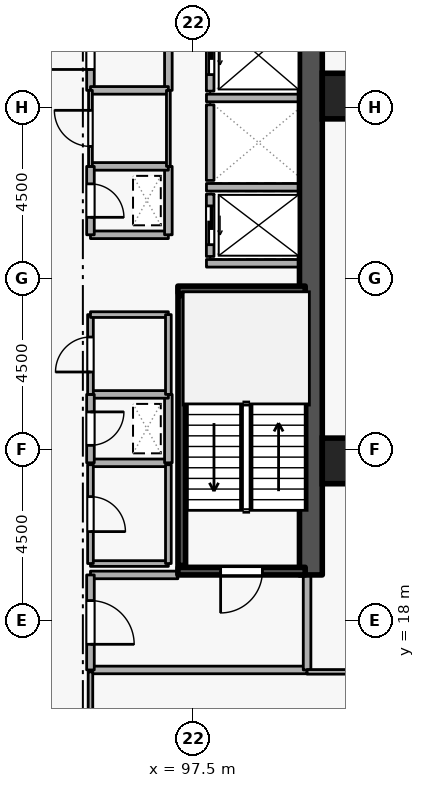
"""IFC4 building model, lengths in metres.
Left out: names, types, materials, properties, quantities, classifications, styles, units other than length and angle.
Written with IfcOpenShell. Run it as: python <this file> out.ifc"""

import sys

from ifc_helpers import new_model, si_unit, direction, frame, frame_2d, origin, origin_2d, place, context, subcontext, project, spatial, rectangle, extrude, element, fill, save


model = new_model("IFC4")
c1 = context("Model", 3, precision=1e-05, world=origin(), true_north=direction((0.0, 1.0)))
c2 = subcontext(c1, "Body", "Model", "MODEL_VIEW")
j1 = project(units=[si_unit("LENGTHUNIT", "METRE"), si_unit("PLANEANGLEUNIT", "RADIAN")], contexts=[c1])
p1 = place(None, origin())
s1 = spatial("IfcSite", under=j1, at=p1, CompositionType="ELEMENT")
p2 = place(p1, origin())
s2 = spatial("IfcBuilding", under=s1, at=p2, CompositionType="ELEMENT")
p3 = place(p2, frame((0.0, 0.0, 90.9)))
s3 = spatial("IfcBuildingStorey", under=s2, at=p3, CompositionType="ELEMENT", Elevation=90.9)
p4 = place(p3, frame((100.6, 19.2, 0.0), z_axis=(0.0, 0.0, 1.0), x_axis=(0.0, 1.0, 0.0)))
e1 = element("IfcWall", 1, at=p4, inside=s3, PredefinedType="SHEAR", context=c2, shape_type="SweptSolid", body=[
    extrude(rectangle(XDim=15.6, YDim=0.6, at=frame_2d((7.8, 0.0))), origin(), (0.0, 0.0, 1.0), 3.6),
])
for number, where, z_axis, x_axis in (
    (2, (101.5, 22.2, 0.0), (0.0, 0.0, 1.0), (1.0, 0.0, 0.0)),
    (3, (101.5, 31.8, 0.0), (0.0, 0.0, 1.0), (1.0, 0.0, 0.0)),
):
    element("IfcColumn", number, at=place(p3, frame(where, z_axis=z_axis, x_axis=x_axis)), inside=s3, PredefinedType="COLUMN", context=c2, shape_type="SweptSolid", body=[
        extrude(rectangle(XDim=1.2, YDim=1.2, at=origin_2d()), origin(), (0.0, 0.0, 1.0), 3.6),
    ])
p5 = place(p3, frame((97.95, 29.22, 0.0), z_axis=(0.0, 0.0, 1.0), x_axis=(0.0, -1.0, 0.0)))
e4 = element("IfcWall", 4, at=p5, inside=s3, PredefinedType="STANDARD", context=c2, shape_type="SweptSolid", body=[
    extrude(rectangle(XDim=1.64, YDim=0.2, at=frame_2d((0.82, 0.0))), origin(), (0.0, 0.0, 1.0), 3.34),
])
p6 = place(p5, frame((0.31, 0.0, 0.0)))
e5 = element("IfcOpeningElement", 5, at=p6, cuts=e4, PredefinedType="OPENING", context=c2, shape_type="SweptSolid", body=[
    extrude(rectangle(XDim=1.02, YDim=2.06, at=frame_2d((0.51, 1.03))), frame((0.0, 0.11, 0.0), z_axis=(0.0, -1.0, 0.0), x_axis=(1.0, 0.0, 0.0)), (0.0, 0.0, 1.0), 0.22),
])
p7 = place(p3, frame((97.95, 31.57, 0.0), z_axis=(0.0, 0.0, 1.0), x_axis=(0.0, -1.0, 0.0)))
e6 = element("IfcWall", 6, at=p7, inside=s3, PredefinedType="STANDARD", context=c2, shape_type="SweptSolid", body=[
    extrude(rectangle(XDim=1.99, YDim=0.2, at=frame_2d((0.995, 0.0))), origin(), (0.0, 0.0, 1.0), 3.34),
])
p8 = place(p3, frame((97.95, 33.82, 0.0), z_axis=(0.0, 0.0, 1.0), x_axis=(0.0, -1.0, 0.0)))
e7 = element("IfcWall", 7, at=p8, inside=s3, PredefinedType="STANDARD", context=c2, shape_type="SweptSolid", body=[
    extrude(rectangle(XDim=1.89, YDim=0.2, at=frame_2d((0.945, 0.0))), origin(), (0.0, 0.0, 1.0), 3.34),
])
p9 = place(p8, frame((0.435, 0.0, 0.0)))
e8 = element("IfcOpeningElement", 8, at=p9, cuts=e7, PredefinedType="OPENING", context=c2, shape_type="SweptSolid", body=[
    extrude(rectangle(XDim=1.02, YDim=2.06, at=frame_2d((0.51, 1.03))), frame((0.0, 0.11, 0.0), z_axis=(0.0, -1.0, 0.0), x_axis=(1.0, 0.0, 0.0)), (0.0, 0.0, 1.0), 0.22),
])
for number, where, z_axis, x_axis in (
    (9, (97.852, 29.4, 0.0), (0.0, 0.0, 1.0), (1.0, 0.0, 0.0)),
    (10, (97.852, 27.4, 0.0), (0.0, 0.0, 1.0), (1.0, 0.0, 0.0)),
    (11, (97.852, 31.75, 0.0), (0.0, 0.0, 1.0), (1.0, 0.0, 0.0)),
):
    element("IfcWall", number, at=place(p3, frame(where, z_axis=z_axis, x_axis=x_axis)), inside=s3, PredefinedType="STANDARD", context=c2, shape_type="SweptSolid", body=[
        extrude(rectangle(XDim=2.436, YDim=0.2, at=frame_2d((1.218, 0.0))), origin(), (0.0, 0.0, 1.0), 3.34),
    ])
p10 = place(p3, frame((100.45, 19.3, 0.0), z_axis=(0.0, 0.0, 1.0), x_axis=(-1.0, 0.0, 0.0)))
e12 = element("IfcWall", 12, at=p10, inside=s3, PredefinedType="SHEAR", context=c2, shape_type="SweptSolid", body=[
    extrude(rectangle(XDim=3.35, YDim=0.2, at=frame_2d((1.675, 0.0))), origin(), (0.0, 0.0, 1.0), 3.6),
])
p11 = place(p10, frame((1.125, 0.0, 0.0)))
e13 = element("IfcOpeningElement", 13, at=p11, cuts=e12, PredefinedType="OPENING", context=c2, shape_type="SweptSolid", body=[
    extrude(rectangle(XDim=1.1, YDim=2.1, at=frame_2d((0.55, 1.05))), frame((0.0, 0.11, 0.0), z_axis=(0.0, -1.0, 0.0), x_axis=(1.0, 0.0, 0.0)), (0.0, 0.0, 1.0), 0.22),
])
p12 = place(p3, frame((97.1, 26.7, 0.0), z_axis=(0.0, 0.0, 1.0), x_axis=(1.0, 0.0, 0.0)))
e14 = element("IfcWall", 14, at=p12, inside=s3, PredefinedType="SHEAR", context=c2, shape_type="SweptSolid", body=[
    extrude(rectangle(XDim=3.35, YDim=0.2, at=frame_2d((1.675, 0.0))), origin(), (0.0, 0.0, 1.0), 3.6),
])
p13 = place(p3, frame((97.203, 26.55, 0.0), z_axis=(0.0, 0.0, 1.0), x_axis=(0.0, -1.0, 0.0)))
e15 = element("IfcWall", 15, at=p13, inside=s3, PredefinedType="SHEAR", context=c2, shape_type="SweptSolid", body=[
    extrude(rectangle(XDim=7.1, YDim=0.2, at=frame_2d((3.55, 0.0))), origin(), (0.0, 0.0, 1.0), 3.6),
])
p14 = place(p3, frame((94.8, 16.7, 0.0), z_axis=(0.0, 0.0, 1.0), x_axis=(1.0, 0.0, 0.0)))
e16 = element("IfcWall", 16, at=p14, inside=s3, PredefinedType="STANDARD", context=c2, shape_type="SweptSolid", body=[
    extrude(rectangle(XDim=5.7, YDim=0.2, at=frame_2d((2.85, 0.0))), origin(), (0.0, 0.0, 1.0), 3.34),
])
p15 = place(p3, frame((100.5, 16.7, 0.0), z_axis=(0.0, 0.0, 1.0), x_axis=(0.0, 1.0, 0.0)))
e17 = element("IfcWall", 17, at=p15, inside=s3, PredefinedType="STANDARD", context=c2, shape_type="SweptSolid", body=[
    extrude(rectangle(XDim=2.5, YDim=0.2, at=frame_2d((1.25, 0.0))), origin(), (0.0, 0.0, 1.0), 3.34),
])
p16 = place(p3, frame((97.1, 19.2, 0.0), z_axis=(0.0, 0.0, 1.0), x_axis=(-1.0, 0.0, 0.0)))
e18 = element("IfcWall", 18, at=p16, inside=s3, PredefinedType="STANDARD", context=c2, shape_type="SweptSolid", body=[
    extrude(rectangle(XDim=2.3, YDim=0.2, at=frame_2d((1.15, 0.0))), origin(), (0.0, 0.0, 1.0), 2.545),
])
p17 = place(p3, frame((94.8, 19.2, 0.0), z_axis=(0.0, 0.0, 1.0), x_axis=(0.0, -1.0, 0.0)))
e19 = element("IfcWall", 19, at=p17, inside=s3, PredefinedType="STANDARD", context=c2, shape_type="SweptSolid", body=[
    extrude(rectangle(XDim=2.5, YDim=0.2, at=frame_2d((1.25, 0.0))), origin(), (0.0, 0.0, 1.0), 3.34),
])
p18 = place(p17, frame((0.675, 0.0, 0.0)))
e20 = element("IfcOpeningElement", 20, at=p18, cuts=e19, PredefinedType="OPENING", context=c2, shape_type="SweptSolid", body=[
    extrude(rectangle(XDim=1.15, YDim=2.1, at=frame_2d((0.575, 1.05))), frame((0.0, 0.11, 0.0), z_axis=(0.0, -1.0, 0.0), x_axis=(1.0, 0.0, 0.0)), (0.0, 0.0, 1.0), 0.22),
])
p19 = place(p3, frame((94.8, 28.15, 0.0), z_axis=(0.0, 0.0, 1.0), x_axis=(1.0, 0.0, 0.0)))
e21 = element("IfcWall", 21, at=p19, inside=s3, PredefinedType="STANDARD", context=c2, shape_type="SweptSolid", body=[
    extrude(rectangle(XDim=2.05, YDim=0.2, at=frame_2d((1.025, 0.0))), origin(), (0.0, 0.0, 1.0), 3.34),
])
p20 = place(p3, frame((96.85, 28.15, 0.0), z_axis=(0.0, 0.0, 1.0), x_axis=(0.0, 1.0, 0.0)))
e22 = element("IfcWall", 22, at=p20, inside=s3, PredefinedType="STANDARD", context=c2, shape_type="SweptSolid", body=[
    extrude(rectangle(XDim=1.8, YDim=0.2, at=frame_2d((0.9, 0.0))), origin(), (0.0, 0.0, 1.0), 3.34),
])
p21 = place(p3, frame((96.85, 29.95, 0.0), z_axis=(0.0, 0.0, 1.0), x_axis=(-1.0, 0.0, 0.0)))
e23 = element("IfcWall", 23, at=p21, inside=s3, PredefinedType="STANDARD", context=c2, shape_type="SweptSolid", body=[
    extrude(rectangle(XDim=2.05, YDim=0.2, at=frame_2d((1.025, 0.0))), origin(), (0.0, 0.0, 1.0), 3.34),
])
p22 = place(p3, frame((94.8, 29.95, 0.0), z_axis=(0.0, 0.0, 1.0), x_axis=(0.0, -1.0, 0.0)))
e24 = element("IfcWall", 24, at=p22, inside=s3, PredefinedType="STANDARD", context=c2, shape_type="SweptSolid", body=[
    extrude(rectangle(XDim=1.8, YDim=0.2, at=frame_2d((0.9, 0.0))), origin(), (0.0, 0.0, 1.0), 3.34),
])
p23 = place(p22, frame((0.46, 0.0, 0.0)))
e25 = element("IfcOpeningElement", 25, at=p23, cuts=e24, PredefinedType="OPENING", context=c2, shape_type="SweptSolid", body=[
    extrude(rectangle(XDim=0.88, YDim=2.04, at=frame_2d((0.44, 1.02))), frame((0.0, 0.11, 0.0), z_axis=(0.0, -1.0, 0.0), x_axis=(1.0, 0.0, 0.0)), (0.0, 0.0, 1.0), 0.22),
])
p24 = place(p3, frame((94.8, 22.15, 0.0), z_axis=(0.0, 0.0, 1.0), x_axis=(1.0, 0.0, 0.0)))
e26 = element("IfcWall", 26, at=p24, inside=s3, PredefinedType="STANDARD", context=c2, shape_type="SweptSolid", body=[
    extrude(rectangle(XDim=2.05, YDim=0.2, at=frame_2d((1.025, 0.0))), origin(), (0.0, 0.0, 1.0), 3.34),
])
p25 = place(p3, frame((96.85, 22.15, 0.0), z_axis=(0.0, 0.0, 1.0), x_axis=(0.0, 1.0, 0.0)))
e27 = element("IfcWall", 27, at=p25, inside=s3, PredefinedType="STANDARD", context=c2, shape_type="SweptSolid", body=[
    extrude(rectangle(XDim=1.8, YDim=0.2, at=frame_2d((0.9, 0.0))), origin(), (0.0, 0.0, 1.0), 3.34),
])
p26 = place(p3, frame((96.85, 23.95, 0.0), z_axis=(0.0, 0.0, 1.0), x_axis=(-1.0, 0.0, 0.0)))
e28 = element("IfcWall", 28, at=p26, inside=s3, PredefinedType="STANDARD", context=c2, shape_type="SweptSolid", body=[
    extrude(rectangle(XDim=2.05, YDim=0.2, at=frame_2d((1.025, 0.0))), origin(), (0.0, 0.0, 1.0), 3.34),
])
p27 = place(p3, frame((94.8, 23.95, 0.0), z_axis=(0.0, 0.0, 1.0), x_axis=(0.0, -1.0, 0.0)))
e29 = element("IfcWall", 29, at=p27, inside=s3, PredefinedType="STANDARD", context=c2, shape_type="SweptSolid", body=[
    extrude(rectangle(XDim=1.8, YDim=0.2, at=frame_2d((0.9, 0.0))), origin(), (0.0, 0.0, 1.0), 3.34),
])
p28 = place(p27, frame((0.46, 0.0, 0.0)))
e30 = element("IfcOpeningElement", 30, at=p28, cuts=e29, PredefinedType="OPENING", context=c2, shape_type="SweptSolid", body=[
    extrude(rectangle(XDim=0.88, YDim=2.04, at=frame_2d((0.44, 1.02))), frame((0.0, 0.11, 0.0), z_axis=(0.0, -1.0, 0.0), x_axis=(1.0, 0.0, 0.0)), (0.0, 0.0, 1.0), 0.22),
])
p29 = place(p3, frame((94.8, 31.95, 0.0), z_axis=(0.0, 0.0, 1.0), x_axis=(0.0, 1.0, 0.0)))
e31 = element("IfcWall", 31, at=p29, inside=s3, PredefinedType="STANDARD", context=c2, shape_type="SweptSolid", body=[
    extrude(rectangle(XDim=2.25, YDim=0.2, at=frame_2d((1.125, 0.0))), origin(), (0.0, 0.0, 1.0), 3.34),
])
p30 = place(p29, frame((0.55, 0.0, 0.0)))
e32 = element("IfcOpeningElement", 32, at=p30, cuts=e31, PredefinedType="OPENING", context=c2, shape_type="SweptSolid", body=[
    extrude(rectangle(XDim=1.15, YDim=2.1, at=frame_2d((0.575, 1.05))), frame((0.0, 0.11, 0.0), z_axis=(0.0, -1.0, 0.0), x_axis=(1.0, 0.0, 0.0)), (0.0, 0.0, 1.0), 0.22),
])
p31 = place(p3, frame((96.85, 34.2, 0.0), z_axis=(0.0, 0.0, 1.0), x_axis=(0.0, -1.0, 0.0)))
e33 = element("IfcWall", 33, at=p31, inside=s3, PredefinedType="STANDARD", context=c2, shape_type="SweptSolid", body=[
    extrude(rectangle(XDim=2.25, YDim=0.2, at=frame_2d((1.125, 0.0))), origin(), (0.0, 0.0, 1.0), 3.34),
])
p32 = place(p3, frame((96.85, 31.95, 0.0), z_axis=(0.0, 0.0, 1.0), x_axis=(-1.0, 0.0, 0.0)))
e34 = element("IfcWall", 34, at=p32, inside=s3, PredefinedType="STANDARD", context=c2, shape_type="SweptSolid", body=[
    extrude(rectangle(XDim=2.05, YDim=0.2, at=frame_2d((1.025, 0.0))), origin(), (0.0, 0.0, 1.0), 3.34),
])
p33 = place(p3, frame((94.8, 19.5, 0.0), z_axis=(0.0, 0.0, 1.0), x_axis=(1.0, 0.0, 0.0)))
e35 = element("IfcWall", 35, at=p33, inside=s3, PredefinedType="PARTITIONING", context=c2, shape_type="SweptSolid", body=[
    extrude(rectangle(XDim=2.05, YDim=0.15, at=frame_2d((1.025, 0.0))), origin(), (0.0, 0.0, 1.0), 2.545),
])
p34 = place(p3, frame((96.85, 19.5, 0.0), z_axis=(0.0, 0.0, 1.0), x_axis=(0.0, 1.0, 0.0)))
e36 = element("IfcWall", 36, at=p34, inside=s3, PredefinedType="PARTITIONING", context=c2, shape_type="SweptSolid", body=[
    extrude(rectangle(XDim=2.6, YDim=0.15, at=frame_2d((1.3, 0.0))), origin(), (0.0, 0.0, 1.0), 3.34),
])
p35 = place(p3, frame((94.8, 22.1, 0.0), z_axis=(0.0, 0.0, 1.0), x_axis=(0.0, -1.0, 0.0)))
e37 = element("IfcWall", 37, at=p35, inside=s3, PredefinedType="PARTITIONING", context=c2, shape_type="SweptSolid", body=[
    extrude(rectangle(XDim=2.6, YDim=0.15, at=frame_2d((1.3, 0.0))), origin(), (0.0, 0.0, 1.0), 3.34),
])
p36 = place(p35, frame((0.84, 0.0, 0.0)))
e38 = element("IfcOpeningElement", 38, at=p36, cuts=e37, PredefinedType="OPENING", context=c2, shape_type="SweptSolid", body=[
    extrude(rectangle(XDim=0.92, YDim=2.08, at=frame_2d((0.46, 1.04))), frame((0.0, 0.085, 0.0), z_axis=(0.0, -1.0, 0.0), x_axis=(1.0, 0.0, 0.0)), (0.0, 0.0, 1.0), 0.17),
])
p37 = place(p3, frame((94.8, 23.95, 0.0), z_axis=(0.0, 0.0, 1.0), x_axis=(0.0, 1.0, 0.0)))
e39 = element("IfcWall", 39, at=p37, inside=s3, PredefinedType="PARTITIONING", context=c2, shape_type="SweptSolid", body=[
    extrude(rectangle(XDim=2.1, YDim=0.15, at=frame_2d((1.05, 0.0))), origin(), (0.0, 0.0, 1.0), 3.34),
])
p38 = place(p37, frame((0.59, 0.0, 0.0)))
e40 = element("IfcOpeningElement", 40, at=p38, cuts=e39, PredefinedType="OPENING", context=c2, shape_type="SweptSolid", body=[
    extrude(rectangle(XDim=0.92, YDim=2.08, at=frame_2d((0.46, 1.04))), frame((0.0, 0.085, 0.0), z_axis=(0.0, -1.0, 0.0), x_axis=(1.0, 0.0, 0.0)), (0.0, 0.0, 1.0), 0.17),
])
p39 = place(p3, frame((94.8, 26.05, 0.0), z_axis=(0.0, 0.0, 1.0), x_axis=(1.0, 0.0, 0.0)))
e41 = element("IfcWall", 41, at=p39, inside=s3, PredefinedType="PARTITIONING", context=c2, shape_type="SweptSolid", body=[
    extrude(rectangle(XDim=2.05, YDim=0.15, at=frame_2d((1.025, 0.0))), origin(), (0.0, 0.0, 1.0), 3.34),
])
p40 = place(p3, frame((96.85, 26.05, 0.0), z_axis=(0.0, 0.0, 1.0), x_axis=(0.0, -1.0, 0.0)))
e42 = element("IfcWall", 42, at=p40, inside=s3, PredefinedType="PARTITIONING", context=c2, shape_type="SweptSolid", body=[
    extrude(rectangle(XDim=2.1, YDim=0.15, at=frame_2d((1.05, 0.0))), origin(), (0.0, 0.0, 1.0), 3.34),
])
p41 = place(p3, frame((94.8, 29.95, 0.0), z_axis=(0.0, 0.0, 1.0), x_axis=(0.0, 1.0, 0.0)))
e43 = element("IfcWall", 43, at=p41, inside=s3, PredefinedType="PARTITIONING", context=c2, shape_type="SweptSolid", body=[
    extrude(rectangle(XDim=2.0, YDim=0.1, at=frame_2d((1.0, 0.0))), origin(), (0.0, 0.0, 1.0), 3.34),
])
p42 = place(p41, frame((0.525, 0.0, 0.0)))
e44 = element("IfcOpeningElement", 44, at=p42, cuts=e43, PredefinedType="OPENING", context=c2, shape_type="SweptSolid", body=[
    extrude(rectangle(XDim=0.95, YDim=2.1, at=frame_2d((0.475, 1.05))), frame((0.0, 0.06, 0.0), z_axis=(0.0, -1.0, 0.0), x_axis=(1.0, 0.0, 0.0)), (0.0, 0.0, 1.0), 0.12),
])
p43 = place(p3, frame((96.85, 31.95, 0.0), z_axis=(0.0, 0.0, 1.0), x_axis=(0.0, -1.0, 0.0)))
e45 = element("IfcWall", 45, at=p43, inside=s3, PredefinedType="PARTITIONING", context=c2, shape_type="SweptSolid", body=[
    extrude(rectangle(XDim=2.0, YDim=0.1, at=frame_2d((1.0, 0.0))), origin(), (0.0, 0.0, 1.0), 3.34),
])
p44 = place(p3, frame((94.8, 14.75, 0.0), z_axis=(0.0, 0.0, 1.0), x_axis=(0.0, 1.0, 0.0)))
e46 = element("IfcWall", 46, at=p44, inside=s3, PredefinedType="PARTITIONING", context=c2, shape_type="SweptSolid", body=[
    extrude(rectangle(XDim=1.9, YDim=0.12, at=frame_2d((0.95, 0.0))), origin(), (0.0, 0.0, 1.0), 3.34),
])
p45 = place(p3, frame((100.5, 16.65, 0.0), z_axis=(0.0, 0.0, 1.0), x_axis=(1.0, 0.0, 0.0)))
e47 = element("IfcWall", 47, at=p45, inside=s3, PredefinedType="PARTITIONING", context=c2, shape_type="SweptSolid", body=[
    extrude(rectangle(XDim=5.92, YDim=0.12, at=frame_2d((2.96, 0.0))), origin(), (0.0, 0.0, 1.0), 3.34),
])
p46 = place(p6, origin())
e48 = element("IfcDoor", 48, at=p46, inside=s3, OperationType="SLIDING_TO_LEFT", PredefinedType="DOOR", context=c2, shape_type="SweptSolid", body=[
    extrude(rectangle(XDim=1.02, YDim=2.06, at=frame_2d((0.51, 1.03))), frame((0.0, 0.025, 0.0), z_axis=(0.0, -1.0, 0.0), x_axis=(1.0, 0.0, 0.0)), (0.0, 0.0, 1.0), 0.05),
])
fill(e5, e48)
p47 = place(p9, origin())
e49 = element("IfcDoor", 49, at=p47, inside=s3, OperationType="SLIDING_TO_LEFT", PredefinedType="DOOR", context=c2, shape_type="SweptSolid", body=[
    extrude(rectangle(XDim=1.02, YDim=2.06, at=frame_2d((0.51, 1.03))), frame((0.0, 0.025, 0.0), z_axis=(0.0, -1.0, 0.0), x_axis=(1.0, 0.0, 0.0)), (0.0, 0.0, 1.0), 0.05),
])
fill(e8, e49)
p48 = place(p11, origin())
e50 = element("IfcDoor", 50, at=p48, inside=s3, OperationType="SINGLE_SWING_RIGHT", PredefinedType="DOOR", context=c2, shape_type="SweptSolid", body=[
    extrude(rectangle(XDim=1.1, YDim=2.1, at=frame_2d((0.55, 1.05))), frame((0.0, 0.025, 0.0), z_axis=(0.0, -1.0, 0.0), x_axis=(1.0, 0.0, 0.0)), (0.0, 0.0, 1.0), 0.05),
])
fill(e13, e50)
p49 = place(p18, origin())
e51 = element("IfcDoor", 51, at=p49, inside=s3, OperationType="SINGLE_SWING_RIGHT", PredefinedType="DOOR", context=c2, shape_type="SweptSolid", body=[
    extrude(rectangle(XDim=1.15, YDim=2.1, at=frame_2d((0.575, 1.05))), frame((0.0, 0.025, 0.0), z_axis=(0.0, -1.0, 0.0), x_axis=(1.0, 0.0, 0.0)), (0.0, 0.0, 1.0), 0.05),
])
fill(e20, e51)
p50 = place(p23, origin())
e52 = element("IfcDoor", 52, at=p50, inside=s3, OperationType="SINGLE_SWING_RIGHT", PredefinedType="DOOR", context=c2, shape_type="SweptSolid", body=[
    extrude(rectangle(XDim=0.88, YDim=2.04, at=frame_2d((0.44, 1.02))), frame((0.0, 0.025, 0.0), z_axis=(0.0, -1.0, 0.0), x_axis=(1.0, 0.0, 0.0)), (0.0, 0.0, 1.0), 0.05),
])
fill(e25, e52)
p51 = place(p28, origin())
e53 = element("IfcDoor", 53, at=p51, inside=s3, OperationType="SINGLE_SWING_LEFT", PredefinedType="DOOR", context=c2, shape_type="SweptSolid", body=[
    extrude(rectangle(XDim=0.88, YDim=2.04, at=frame_2d((0.44, 1.02))), frame((0.0, 0.025, 0.0), z_axis=(0.0, -1.0, 0.0), x_axis=(1.0, 0.0, 0.0)), (0.0, 0.0, 1.0), 0.05),
])
fill(e30, e53)
p52 = place(p36, origin())
e54 = element("IfcDoor", 54, at=p52, inside=s3, OperationType="SINGLE_SWING_RIGHT", PredefinedType="DOOR", context=c2, shape_type="SweptSolid", body=[
    extrude(rectangle(XDim=0.92, YDim=2.08, at=frame_2d((0.46, 1.04))), frame((0.0, 0.025, 0.0), z_axis=(0.0, -1.0, 0.0), x_axis=(1.0, 0.0, 0.0)), (0.0, 0.0, 1.0), 0.05),
])
fill(e38, e54)
p53 = place(p38, origin())
e55 = element("IfcDoor", 55, at=p53, inside=s3, OperationType="SINGLE_SWING_LEFT", PredefinedType="DOOR", context=c2, shape_type="SweptSolid", body=[
    extrude(rectangle(XDim=0.92, YDim=2.08, at=frame_2d((0.46, 1.04))), frame((0.0, 0.025, 0.0), z_axis=(0.0, -1.0, 0.0), x_axis=(1.0, 0.0, 0.0)), (0.0, 0.0, 1.0), 0.05),
])
fill(e40, e55)
p54 = place(p42, origin())
e56 = element("IfcDoor", 56, at=p54, inside=s3, OperationType="SINGLE_SWING_RIGHT", PredefinedType="DOOR", context=c2, shape_type="SweptSolid", body=[
    extrude(rectangle(XDim=0.95, YDim=2.1, at=frame_2d((0.475, 1.05))), frame((0.0, 0.025, 0.0), z_axis=(0.0, -1.0, 0.0), x_axis=(1.0, 0.0, 0.0)), (0.0, 0.0, 1.0), 0.05),
])
fill(e44, e56)
p55 = place(p30, origin())
e57 = element("IfcDoor", 57, at=p55, inside=s3, OperationType="SINGLE_SWING_LEFT", PredefinedType="DOOR", context=c2, shape_type="SweptSolid", body=[
    extrude(rectangle(XDim=1.15, YDim=2.1, at=frame_2d((0.575, 1.05))), frame((0.0, 0.025, 0.0), z_axis=(0.0, -1.0, 0.0), x_axis=(1.0, 0.0, 0.0)), (0.0, 0.0, 1.0), 0.05),
])
fill(e32, e57)
save(model, sys.argv[1])
